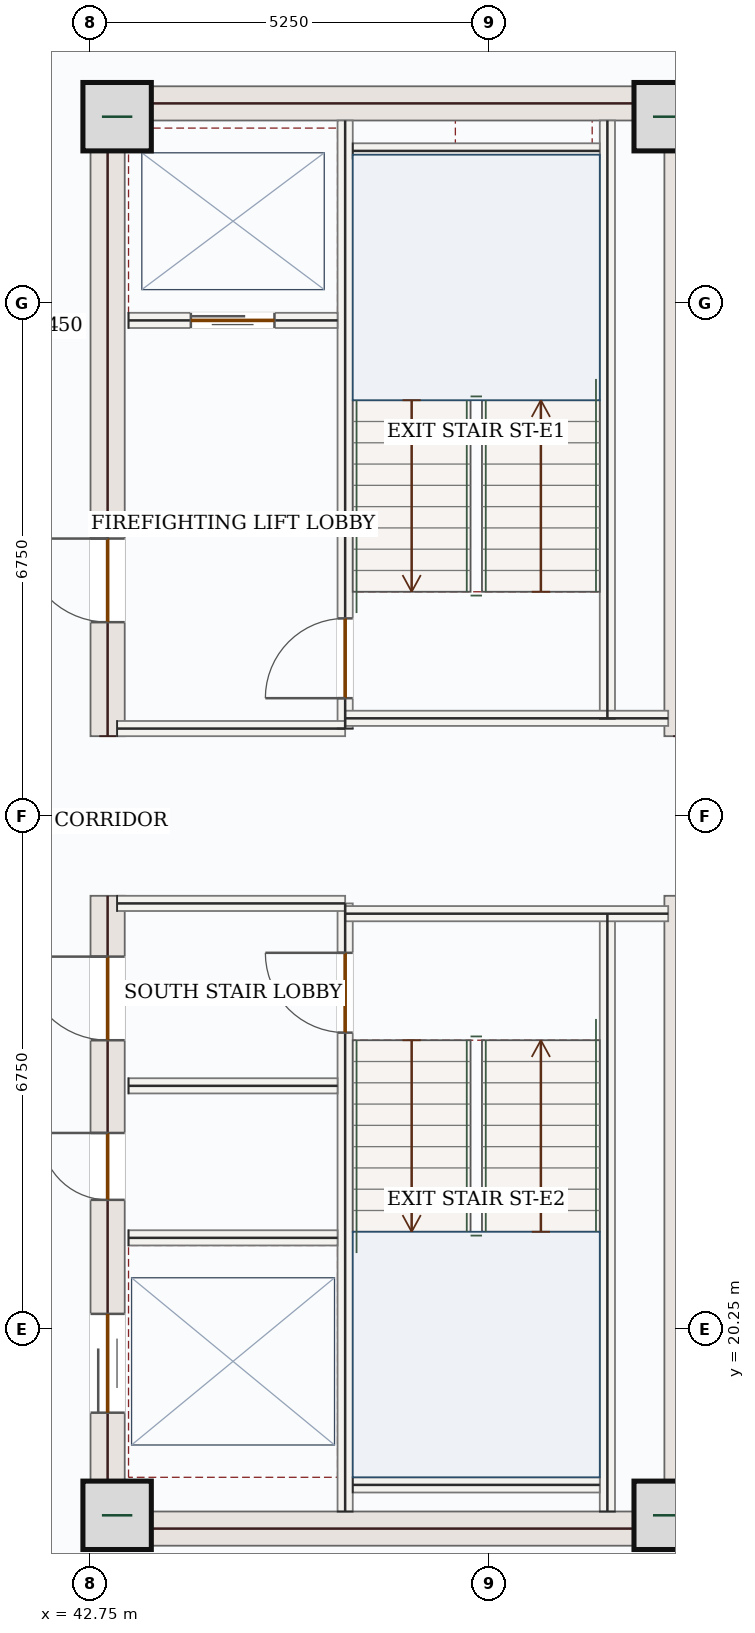
"""IFC4 building model, lengths in metres.
Left out: names, types, materials, properties, quantities, classifications, styles, units other than length and angle.
Written with IfcOpenShell. Run it as: python <this file> out.ifc"""

import sys

from ifc_helpers import new_model, si_unit, direction, frame, frame_2d, origin, origin_2d, place, context, subcontext, project, spatial, rectangle, extrude, source, transform, mapped, element, fill, save


model = new_model("IFC4")
c1 = context("Model", 3, precision=1e-05, world=origin(), true_north=direction((0.0, 1.0)))
c2 = subcontext(c1, "Body", "Model", "MODEL_VIEW")
j1 = project(units=[si_unit("LENGTHUNIT", "METRE"), si_unit("PLANEANGLEUNIT", "RADIAN")], contexts=[c1])
p1 = place(None, origin())
s1 = spatial("IfcSite", under=j1, at=p1, CompositionType="ELEMENT")
p2 = place(p1, origin())
s2 = spatial("IfcBuilding", under=s1, at=p2, CompositionType="ELEMENT")
p3 = place(p2, frame((0.0, 0.0, 357.3)))
s3 = spatial("IfcBuildingStorey", under=s2, at=p3, CompositionType="ELEMENT", Elevation=357.3)
p4 = place(p3, frame((42.975, 17.4, 0.0), z_axis=(0.0, 0.0, 1.0), x_axis=(0.0, 1.0, 0.0)))
e1 = element("IfcWall", 1, at=p4, inside=s3, PredefinedType="SHEAR", context=c2, shape_type="SweptSolid", body=[
    extrude(rectangle(XDim=8.55, YDim=0.45, at=frame_2d((4.275, 0.0))), origin(), (0.0, 0.0, 1.0), 3.45),
])
p5 = place(p4, frame((6.65, 0.0, 0.0)))
e2 = element("IfcOpeningElement", 2, at=p5, cuts=e1, PredefinedType="OPENING", context=c2, shape_type="SweptSolid", body=[
    extrude(rectangle(XDim=1.1, YDim=2.2, at=frame_2d((0.55, 1.1))), frame((0.0, 0.235, 0.0), z_axis=(0.0, -1.0, 0.0), x_axis=(1.0, 0.0, 0.0)), (0.0, 0.0, 1.0), 0.47),
])
p6 = place(p4, frame((1.75, 0.0, 0.0)))
e3 = element("IfcOpeningElement", 3, at=p6, cuts=e1, PredefinedType="OPENING", context=c2, shape_type="SweptSolid", body=[
    extrude(rectangle(XDim=1.3, YDim=2.2, at=frame_2d((0.65, 1.1))), frame((0.0, 0.235, 0.0), z_axis=(0.0, -1.0, 0.0), x_axis=(1.0, 0.0, 0.0)), (0.0, 0.0, 1.0), 0.47),
])
p7 = place(p4, frame((4.55, 0.0, 0.0)))
e4 = element("IfcOpeningElement", 4, at=p7, cuts=e1, PredefinedType="OPENING", context=c2, shape_type="SweptSolid", body=[
    extrude(rectangle(XDim=0.88, YDim=2.1, at=frame_2d((0.44, 1.05))), frame((0.0, 0.235, 0.0), z_axis=(0.0, -1.0, 0.0), x_axis=(1.0, 0.0, 0.0)), (0.0, 0.0, 1.0), 0.47),
])
p8 = place(p3, frame((42.975, 28.05, 0.0), z_axis=(0.0, 0.0, 1.0), x_axis=(0.0, 1.0, 0.0)))
e5 = element("IfcWall", 5, at=p8, inside=s3, PredefinedType="SHEAR", context=c2, shape_type="SweptSolid", body=[
    extrude(rectangle(XDim=8.55, YDim=0.45, at=frame_2d((4.275, 0.0))), origin(), (0.0, 0.0, 1.0), 3.45),
])
p9 = place(p8, frame((1.5, 0.0, 0.0)))
e6 = element("IfcOpeningElement", 6, at=p9, cuts=e5, PredefinedType="OPENING", context=c2, shape_type="SweptSolid", body=[
    extrude(rectangle(XDim=1.1, YDim=2.2, at=frame_2d((0.55, 1.1))), frame((0.0, 0.235, 0.0), z_axis=(0.0, -1.0, 0.0), x_axis=(1.0, 0.0, 0.0)), (0.0, 0.0, 1.0), 0.47),
])
m1 = source(origin(), c2, "Body", "SweptSolid", [
    extrude(rectangle(XDim=8.55, YDim=0.45, at=frame_2d((4.275, 0.0))), origin(), (0.0, 0.0, 1.0), 3.45),
])
for number, where, z_axis, x_axis in (
    (7, (50.525, 17.4, 0.0), (0.0, 0.0, 1.0), (0.0, 1.0, 0.0)),
    (8, (50.525, 28.05, 0.0), (0.0, 0.0, 1.0), (0.0, 1.0, 0.0)),
):
    element("IfcWall", number, at=place(p3, frame(where, z_axis=z_axis, x_axis=x_axis)), inside=s3, PredefinedType="SHEAR", context=c2, shape_type="MappedRepresentation", body=[
        mapped(m1, transform((0.0, 0.0, 0.0), x_axis=(1.0, 0.0, 0.0), y_axis=(0.0, 1.0, 0.0), z_axis=(0.0, 0.0, 1.0), scale=1.0)),
    ])
m2 = source(origin(), c2, "Body", "SweptSolid", [
    extrude(rectangle(XDim=7.1, YDim=0.45, at=frame_2d((3.55, 0.0))), origin(), (0.0, 0.0, 1.0), 3.45),
])
for number, where, z_axis, x_axis in (
    (9, (43.2, 17.625, 0.0), (0.0, 0.0, 1.0), (1.0, 0.0, 0.0)),
    (10, (43.2, 36.375, 0.0), (0.0, 0.0, 1.0), (1.0, 0.0, 0.0)),
):
    element("IfcWall", number, at=place(p3, frame(where, z_axis=z_axis, x_axis=x_axis)), inside=s3, PredefinedType="SHEAR", context=c2, shape_type="MappedRepresentation", body=[
        mapped(m2, transform((0.0, 0.0, 0.0), x_axis=(1.0, 0.0, 0.0), y_axis=(0.0, 1.0, 0.0), z_axis=(0.0, 0.0, 1.0), scale=1.0)),
    ])
m3 = source(origin(), c2, "Body", "SweptSolid", [
    extrude(rectangle(XDim=0.9, YDim=0.9, at=origin_2d()), origin(), (0.0, 0.0, 1.0), 3.75),
])
for number, where, z_axis, x_axis in (
    (11, (43.1, 17.8, 0.0), (0.0, 0.0, 1.0), (1.0, 0.0, 0.0)),
    (12, (50.35, 17.8, 0.0), (0.0, 0.0, 1.0), (1.0, 0.0, 0.0)),
    (13, (43.1, 36.2, 0.0), (0.0, 0.0, 1.0), (1.0, 0.0, 0.0)),
    (14, (50.35, 36.2, 0.0), (0.0, 0.0, 1.0), (1.0, 0.0, 0.0)),
):
    element("IfcColumn", number, at=place(p3, frame(where, z_axis=z_axis, x_axis=x_axis)), inside=s3, PredefinedType="COLUMN", context=c2, shape_type="MappedRepresentation", body=[
        mapped(m3, transform((0.0, 0.0, 0.0), x_axis=(1.0, 0.0, 0.0), y_axis=(0.0, 1.0, 0.0), z_axis=(0.0, 0.0, 1.0), scale=1.0)),
    ])
p10 = place(p3, frame((48.995, 39.907, 0.0), z_axis=(0.0, 0.0, 1.0), x_axis=(0.681486568047, -0.731830620821, 0.0)))
e15 = element("IfcWall", 15, at=p10, inside=s3, PredefinedType="SOLIDWALL", context=c2, shape_type="SweptSolid", body=[
    extrude(rectangle(XDim=5.965, YDim=0.28, at=frame_2d((2.982, 0.0))), origin(), (0.0, 0.0, 1.0), 3.45),
])
p11 = place(p10, frame((2.232, 0.0, 0.85)))
e16 = element("IfcOpeningElement", 16, at=p11, cuts=e15, PredefinedType="OPENING", context=c2, shape_type="SweptSolid", body=[
    extrude(rectangle(XDim=1.5, YDim=1.5, at=frame_2d((0.75, 0.75))), frame((0.0, 0.15, 0.0), z_axis=(0.0, -1.0, 0.0), x_axis=(1.0, 0.0, 0.0)), (0.0, 0.0, 1.0), 0.3),
])
m4 = source(origin(), c2, "Body", "SweptSolid", [
    extrude(rectangle(XDim=7.87, YDim=0.2, at=frame_2d((3.935, 0.0))), origin(), (0.0, 0.0, 1.0), 3.45),
])
for number, where, z_axis, x_axis in (
    (17, (49.55, 17.85, 0.0), (0.0, 0.0, 1.0), (0.0, 1.0, 0.0)),
    (18, (49.55, 28.28, 0.0), (0.0, 0.0, 1.0), (0.0, 1.0, 0.0)),
):
    element("IfcWall", number, at=place(p3, frame(where, z_axis=z_axis, x_axis=x_axis)), inside=s3, PredefinedType="SOLIDWALL", context=c2, shape_type="MappedRepresentation", body=[
        mapped(m4, transform((0.0, 0.0, 0.0), x_axis=(1.0, 0.0, 0.0), y_axis=(0.0, 1.0, 0.0), z_axis=(0.0, 0.0, 1.0), scale=1.0)),
    ])
p12 = place(p3, frame((46.1, 17.85, 0.0), z_axis=(0.0, 0.0, 1.0), x_axis=(0.0, 1.0, 0.0)))
e19 = element("IfcWall", 19, at=p12, inside=s3, PredefinedType="SOLIDWALL", context=c2, shape_type="SweptSolid", body=[
    extrude(rectangle(XDim=8.0, YDim=0.2, at=frame_2d((4.0, 0.0))), origin(), (0.0, 0.0, 1.0), 3.45),
])
p13 = place(p12, frame((6.3, 0.0, 0.0)))
e20 = element("IfcOpeningElement", 20, at=p13, cuts=e19, PredefinedType="OPENING", context=c2, shape_type="SweptSolid", body=[
    extrude(rectangle(XDim=1.05, YDim=2.15, at=frame_2d((0.525, 1.075))), frame((0.0, 0.11, 0.0), z_axis=(0.0, -1.0, 0.0), x_axis=(1.0, 0.0, 0.0)), (0.0, 0.0, 1.0), 0.22),
])
p14 = place(p3, frame((46.1, 28.15, 0.0), z_axis=(0.0, 0.0, 1.0), x_axis=(0.0, 1.0, 0.0)))
e21 = element("IfcWall", 21, at=p14, inside=s3, PredefinedType="SOLIDWALL", context=c2, shape_type="SweptSolid", body=[
    extrude(rectangle(XDim=8.0, YDim=0.2, at=frame_2d((4.0, 0.0))), origin(), (0.0, 0.0, 1.0), 3.45),
])
p15 = place(p14, frame((0.4, 0.0, 0.0)))
e22 = element("IfcOpeningElement", 22, at=p15, cuts=e21, PredefinedType="OPENING", context=c2, shape_type="SweptSolid", body=[
    extrude(rectangle(XDim=1.05, YDim=2.15, at=frame_2d((0.525, 1.075))), frame((0.0, 0.11, 0.0), z_axis=(0.0, -1.0, 0.0), x_axis=(1.0, 0.0, 0.0)), (0.0, 0.0, 1.0), 0.22),
])
m5 = source(origin(), c2, "Body", "SweptSolid", [
    extrude(rectangle(XDim=3.0, YDim=0.2, at=frame_2d((1.5, 0.0))), origin(), (0.0, 0.0, 1.0), 3.45),
])
p16 = place(p3, frame((43.1, 25.85, 0.0), z_axis=(0.0, 0.0, 1.0), x_axis=(1.0, 0.0, 0.0)))
e23 = element("IfcWall", 23, at=p16, inside=s3, PredefinedType="SOLIDWALL", context=c2, shape_type="MappedRepresentation", body=[
    mapped(m5, transform((0.0, 0.0, 0.0), x_axis=(1.0, 0.0, 0.0), y_axis=(0.0, 1.0, 0.0), z_axis=(0.0, 0.0, 1.0), scale=1.0)),
])
m6 = source(origin(), c2, "Body", "SweptSolid", [
    extrude(rectangle(XDim=4.25, YDim=0.2, at=frame_2d((2.125, 0.0))), origin(), (0.0, 0.0, 1.0), 3.45),
])
p17 = place(p3, frame((46.1, 25.715, 0.0), z_axis=(0.0, 0.0, 1.0), x_axis=(1.0, 0.0, 0.0)))
e24 = element("IfcWall", 24, at=p17, inside=s3, PredefinedType="SOLIDWALL", context=c2, shape_type="MappedRepresentation", body=[
    mapped(m6, transform((0.0, 0.0, 0.0), x_axis=(1.0, 0.0, 0.0), y_axis=(0.0, 1.0, 0.0), z_axis=(0.0, 0.0, 1.0), scale=1.0)),
])
p18 = place(p3, frame((43.1, 28.15, 0.0), z_axis=(0.0, 0.0, 1.0), x_axis=(1.0, 0.0, 0.0)))
e25 = element("IfcWall", 25, at=p18, inside=s3, PredefinedType="SOLIDWALL", context=c2, shape_type="MappedRepresentation", body=[
    mapped(m5, transform((0.0, 0.0, 0.0), x_axis=(1.0, 0.0, 0.0), y_axis=(0.0, 1.0, 0.0), z_axis=(0.0, 0.0, 1.0), scale=1.0)),
])
p19 = place(p3, frame((46.1, 28.285, 0.0), z_axis=(0.0, 0.0, 1.0), x_axis=(1.0, 0.0, 0.0)))
e26 = element("IfcWall", 26, at=p19, inside=s3, PredefinedType="SOLIDWALL", context=c2, shape_type="MappedRepresentation", body=[
    mapped(m6, transform((0.0, 0.0, 0.0), x_axis=(1.0, 0.0, 0.0), y_axis=(0.0, 1.0, 0.0), z_axis=(0.0, 0.0, 1.0), scale=1.0)),
])
m7 = source(origin(), c2, "Body", "SweptSolid", [
    extrude(rectangle(XDim=3.25, YDim=0.2, at=frame_2d((1.625, 0.0))), origin(), (0.0, 0.0, 1.0), 3.45),
])
for number, where, z_axis, x_axis in (
    (27, (46.2, 35.75, 0.0), (0.0, 0.0, 1.0), (1.0, 0.0, 0.0)),
    (28, (46.2, 18.2, 0.0), (0.0, 0.0, 1.0), (1.0, 0.0, 0.0)),
):
    element("IfcWall", number, at=place(p3, frame(where, z_axis=z_axis, x_axis=x_axis)), inside=s3, PredefinedType="SOLIDWALL", context=c2, shape_type="MappedRepresentation", body=[
        mapped(m7, transform((0.0, 0.0, 0.0), x_axis=(1.0, 0.0, 0.0), y_axis=(0.0, 1.0, 0.0), z_axis=(0.0, 0.0, 1.0), scale=1.0)),
    ])
p20 = place(p3, frame((43.25, 33.52, 0.0), z_axis=(0.0, 0.0, 1.0), x_axis=(1.0, 0.0, 0.0)))
e29 = element("IfcWall", 29, at=p20, inside=s3, PredefinedType="SOLIDWALL", context=c2, shape_type="SweptSolid", body=[
    extrude(rectangle(XDim=2.75, YDim=0.2, at=frame_2d((1.375, 0.0))), origin(), (0.0, 0.0, 1.0), 3.45),
])
p21 = place(p20, frame((0.82, 0.0, 0.0)))
e30 = element("IfcOpeningElement", 30, at=p21, cuts=e29, PredefinedType="OPENING", context=c2, shape_type="SweptSolid", body=[
    extrude(rectangle(XDim=1.1, YDim=2.15, at=frame_2d((0.55, 1.075))), frame((0.0, 0.11, 0.0), z_axis=(0.0, -1.0, 0.0), x_axis=(1.0, 0.0, 0.0)), (0.0, 0.0, 1.0), 0.22),
])
m8 = source(origin(), c2, "Body", "SweptSolid", [
    extrude(rectangle(XDim=2.75, YDim=0.2, at=frame_2d((1.375, 0.0))), origin(), (0.0, 0.0, 1.0), 3.45),
])
for number, where, z_axis, x_axis in (
    (31, (43.25, 23.45, 0.0), (0.0, 0.0, 1.0), (1.0, 0.0, 0.0)),
    (32, (43.25, 21.45, 0.0), (0.0, 0.0, 1.0), (1.0, 0.0, 0.0)),
):
    element("IfcWall", number, at=place(p3, frame(where, z_axis=z_axis, x_axis=x_axis)), inside=s3, PredefinedType="SOLIDWALL", context=c2, shape_type="MappedRepresentation", body=[
        mapped(m8, transform((0.0, 0.0, 0.0), x_axis=(1.0, 0.0, 0.0), y_axis=(0.0, 1.0, 0.0), z_axis=(0.0, 0.0, 1.0), scale=1.0)),
    ])
m9 = source(origin(), c2, "Body", "SweptSolid", [
    extrude(rectangle(XDim=1.05, YDim=2.15, at=frame_2d((0.525, 1.075))), frame((0.0, 0.025, 0.0), z_axis=(0.0, -1.0, 0.0), x_axis=(1.0, 0.0, 0.0)), (0.0, 0.0, 1.0), 0.05),
])
p22 = place(p15, origin())
e33 = element("IfcDoor", 33, at=p22, inside=s3, OperationType="SINGLE_SWING_LEFT", PredefinedType="DOOR", context=c2, shape_type="MappedRepresentation", body=[
    mapped(m9, transform((0.0, 0.0, 0.0), x_axis=(1.0, 0.0, 0.0), y_axis=(0.0, 1.0, 0.0), z_axis=(0.0, 0.0, 1.0), scale=1.0)),
])
fill(e22, e33)
p23 = place(p13, origin())
e34 = element("IfcDoor", 34, at=p23, inside=s3, OperationType="SINGLE_SWING_RIGHT", PredefinedType="DOOR", context=c2, shape_type="MappedRepresentation", body=[
    mapped(m9, transform((0.0, 0.0, 0.0), x_axis=(1.0, 0.0, 0.0), y_axis=(0.0, 1.0, 0.0), z_axis=(0.0, 0.0, 1.0), scale=1.0)),
])
fill(e20, e34)
m10 = source(origin(), c2, "Body", "SweptSolid", [
    extrude(rectangle(XDim=1.1, YDim=2.15, at=frame_2d((0.55, 1.075))), frame((0.0, 0.025, 0.0), z_axis=(0.0, -1.0, 0.0), x_axis=(1.0, 0.0, 0.0)), (0.0, 0.0, 1.0), 0.05),
])
p24 = place(p21, origin())
e35 = element("IfcDoor", 35, at=p24, inside=s3, OperationType="DOUBLE_DOOR_SLIDING", PredefinedType="DOOR", context=c2, shape_type="MappedRepresentation", body=[
    mapped(m10, transform((0.0, 0.0, 0.0), x_axis=(1.0, 0.0, 0.0), y_axis=(0.0, 1.0, 0.0), z_axis=(0.0, 0.0, 1.0), scale=1.0)),
])
fill(e30, e35)
m11 = source(origin(), c2, "Body", "SweptSolid", [
    extrude(rectangle(XDim=1.1, YDim=2.2, at=frame_2d((0.55, 1.1))), frame((0.0, 0.025, 0.0), z_axis=(0.0, -1.0, 0.0), x_axis=(1.0, 0.0, 0.0)), (0.0, 0.0, 1.0), 0.05),
])
p25 = place(p9, origin())
e36 = element("IfcDoor", 36, at=p25, inside=s3, OperationType="SINGLE_SWING_RIGHT", PredefinedType="DOOR", context=c2, shape_type="MappedRepresentation", body=[
    mapped(m11, transform((0.0, 0.0, 0.0), x_axis=(1.0, 0.0, 0.0), y_axis=(0.0, 1.0, 0.0), z_axis=(0.0, 0.0, 1.0), scale=1.0)),
])
fill(e6, e36)
p26 = place(p5, origin())
e37 = element("IfcDoor", 37, at=p26, inside=s3, OperationType="SINGLE_SWING_RIGHT", PredefinedType="DOOR", context=c2, shape_type="MappedRepresentation", body=[
    mapped(m11, transform((0.0, 0.0, 0.0), x_axis=(1.0, 0.0, 0.0), y_axis=(0.0, 1.0, 0.0), z_axis=(0.0, 0.0, 1.0), scale=1.0)),
])
fill(e2, e37)
m12 = source(origin(), c2, "Body", "SweptSolid", [
    extrude(rectangle(XDim=1.3, YDim=2.2, at=frame_2d((0.65, 1.1))), frame((0.0, 0.025, 0.0), z_axis=(0.0, -1.0, 0.0), x_axis=(1.0, 0.0, 0.0)), (0.0, 0.0, 1.0), 0.05),
])
p27 = place(p6, origin())
e38 = element("IfcDoor", 38, at=p27, inside=s3, OperationType="DOUBLE_DOOR_SLIDING", PredefinedType="DOOR", context=c2, shape_type="MappedRepresentation", body=[
    mapped(m12, transform((0.0, 0.0, 0.0), x_axis=(1.0, 0.0, 0.0), y_axis=(0.0, 1.0, 0.0), z_axis=(0.0, 0.0, 1.0), scale=1.0)),
])
fill(e3, e38)
m13 = source(origin(), c2, "Body", "SweptSolid", [
    extrude(rectangle(XDim=0.88, YDim=2.1, at=frame_2d((0.44, 1.05))), frame((0.0, 0.025, 0.0), z_axis=(0.0, -1.0, 0.0), x_axis=(1.0, 0.0, 0.0)), (0.0, 0.0, 1.0), 0.05),
])
p28 = place(p7, origin())
e39 = element("IfcDoor", 39, at=p28, inside=s3, OperationType="SINGLE_SWING_RIGHT", PredefinedType="DOOR", context=c2, shape_type="MappedRepresentation", body=[
    mapped(m13, transform((0.0, 0.0, 0.0), x_axis=(1.0, 0.0, 0.0), y_axis=(0.0, 1.0, 0.0), z_axis=(0.0, 0.0, 1.0), scale=1.0)),
])
fill(e4, e39)
save(model, sys.argv[1])
